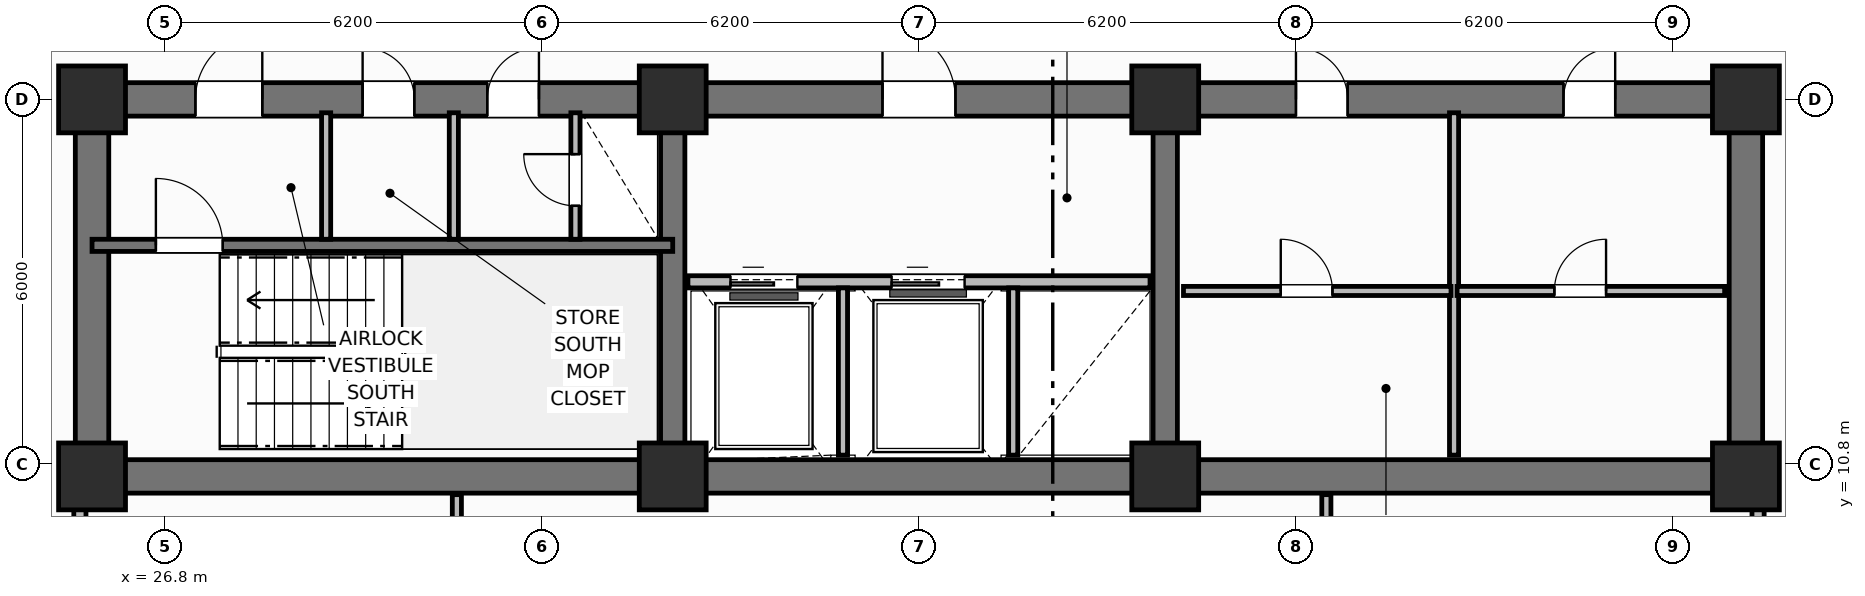
"""IFC4 building model, lengths in metres.
Left out: names, types, materials, properties, quantities, classifications, styles, units other than length and angle.
Written with IfcOpenShell. Run it as: python <this file> out.ifc"""

import sys

from ifc_helpers import new_model, si_unit, direction, frame, frame_2d, origin, origin_2d, place, context, subcontext, project, spatial, rectangle, extrude, element, fill, save


model = new_model("IFC4")
c1 = context("Model", 3, precision=1e-05, world=origin(), true_north=direction((0.0, 1.0)))
c2 = subcontext(c1, "Body", "Model", "MODEL_VIEW")
j1 = project(units=[si_unit("LENGTHUNIT", "METRE"), si_unit("PLANEANGLEUNIT", "RADIAN")], contexts=[c1])
p1 = place(None, origin())
s1 = spatial("IfcSite", under=j1, at=p1, CompositionType="ELEMENT")
p2 = place(p1, origin())
s2 = spatial("IfcBuilding", under=s1, at=p2, CompositionType="ELEMENT")
p3 = place(p2, frame((0.0, 0.0, 95.7)))
s3 = spatial("IfcBuildingStorey", under=s2, at=p3, CompositionType="ELEMENT", Elevation=95.7)
p4 = place(p3, frame((52.8, 10.6, 0.0), z_axis=(0.0, 0.0, 1.0), x_axis=(-1.0, 0.0, 0.0)))
e1 = element("IfcWall", 1, at=p4, inside=s3, PredefinedType="SHEAR", context=c2, shape_type="SweptSolid", body=[
    extrude(rectangle(XDim=27.2, YDim=0.55, at=frame_2d((13.6, 0.0))), origin(), (0.0, 0.0, 1.0), 3.7),
])
for number, where, z_axis, x_axis in (
    (2, (25.6, 10.875, 0.0), (0.0, 0.0, 1.0), (0.0, 1.0, 0.0)),
    (3, (52.8, 10.875, 0.0), (0.0, 0.0, 1.0), (0.0, 1.0, 0.0)),
):
    element("IfcWall", number, at=place(p3, frame(where, z_axis=z_axis, x_axis=x_axis)), inside=s3, PredefinedType="SHEAR", context=c2, shape_type="SweptSolid", body=[
        extrude(rectangle(XDim=5.65, YDim=0.55, at=frame_2d((2.825, 0.0))), origin(), (0.0, 0.0, 1.0), 3.7),
    ])
p5 = place(p3, frame((25.6, 16.8, 0.0), z_axis=(0.0, 0.0, 1.0), x_axis=(1.0, 0.0, 0.0)))
e4 = element("IfcWall", 4, at=p5, inside=s3, PredefinedType="SHEAR", context=c2, shape_type="SweptSolid", body=[
    extrude(rectangle(XDim=27.2, YDim=0.55, at=frame_2d((13.6, 0.0))), origin(), (0.0, 0.0, 1.0), 3.7),
])
p6 = place(p5, frame((1.7, 0.0, 0.0)))
e5 = element("IfcOpeningElement", 5, at=p6, cuts=e4, PredefinedType="OPENING", context=c2, shape_type="SweptSolid", body=[
    extrude(rectangle(XDim=1.1, YDim=2.15, at=frame_2d((0.55, 1.075))), frame((0.0, 0.285, 0.0), z_axis=(0.0, -1.0, 0.0), x_axis=(1.0, 0.0, 0.0)), (0.0, 0.0, 1.0), 0.57),
])
p7 = place(p5, frame((4.45, 0.0, 0.0)))
e6 = element("IfcOpeningElement", 6, at=p7, cuts=e4, PredefinedType="OPENING", context=c2, shape_type="SweptSolid", body=[
    extrude(rectangle(XDim=0.85, YDim=2.1, at=frame_2d((0.425, 1.05))), frame((0.0, 0.285, 0.0), z_axis=(0.0, -1.0, 0.0), x_axis=(1.0, 0.0, 0.0)), (0.0, 0.0, 1.0), 0.57),
])
p8 = place(p5, frame((6.5, 0.0, 0.0)))
e7 = element("IfcOpeningElement", 7, at=p8, cuts=e4, PredefinedType="OPENING", context=c2, shape_type="SweptSolid", body=[
    extrude(rectangle(XDim=0.85, YDim=2.1, at=frame_2d((0.425, 1.05))), frame((0.0, 0.285, 0.0), z_axis=(0.0, -1.0, 0.0), x_axis=(1.0, 0.0, 0.0)), (0.0, 0.0, 1.0), 0.57),
])
p9 = place(p5, frame((13.0, 0.0, 0.0)))
e8 = element("IfcOpeningElement", 8, at=p9, cuts=e4, PredefinedType="OPENING", context=c2, shape_type="SweptSolid", body=[
    extrude(rectangle(XDim=1.2, YDim=2.15, at=frame_2d((0.6, 1.075))), frame((0.0, 0.285, 0.0), z_axis=(0.0, -1.0, 0.0), x_axis=(1.0, 0.0, 0.0)), (0.0, 0.0, 1.0), 0.57),
])
p10 = place(p5, frame((19.8, 0.0, 0.0)))
e9 = element("IfcOpeningElement", 9, at=p10, cuts=e4, PredefinedType="OPENING", context=c2, shape_type="SweptSolid", body=[
    extrude(rectangle(XDim=0.85, YDim=2.1, at=frame_2d((0.425, 1.05))), frame((0.0, 0.285, 0.0), z_axis=(0.0, -1.0, 0.0), x_axis=(1.0, 0.0, 0.0)), (0.0, 0.0, 1.0), 0.57),
])
p11 = place(p5, frame((24.2, 0.0, 0.0)))
e10 = element("IfcOpeningElement", 10, at=p11, cuts=e4, PredefinedType="OPENING", context=c2, shape_type="SweptSolid", body=[
    extrude(rectangle(XDim=0.85, YDim=2.1, at=frame_2d((0.425, 1.05))), frame((0.0, 0.285, 0.0), z_axis=(0.0, -1.0, 0.0), x_axis=(1.0, 0.0, 0.0)), (0.0, 0.0, 1.0), 0.57),
])
for number, where, z_axis, x_axis in (
    (11, (35.15, 10.875, 0.0), (0.0, 0.0, 1.0), (0.0, 1.0, 0.0)),
    (12, (43.25, 10.875, 0.0), (0.0, 0.0, 1.0), (0.0, 1.0, 0.0)),
):
    element("IfcWall", number, at=place(p3, frame(where, z_axis=z_axis, x_axis=x_axis)), inside=s3, PredefinedType="SHEAR", context=c2, shape_type="SweptSolid", body=[
        extrude(rectangle(XDim=5.65, YDim=0.4, at=frame_2d((2.825, 0.0))), origin(), (0.0, 0.0, 1.0), 3.7),
    ])
for number, where, z_axis, x_axis in (
    (13, (25.6, 10.6, 0.0), (0.0, 0.0, 1.0), (1.0, 0.0, 0.0)),
    (14, (25.6, 16.8, 0.0), (0.0, 0.0, 1.0), (1.0, 0.0, 0.0)),
    (15, (35.15, 10.6, 0.0), (0.0, 0.0, 1.0), (1.0, 0.0, 0.0)),
    (16, (35.15, 16.8, 0.0), (0.0, 0.0, 1.0), (1.0, 0.0, 0.0)),
    (17, (43.25, 10.6, 0.0), (0.0, 0.0, 1.0), (1.0, 0.0, 0.0)),
    (18, (43.25, 16.8, 0.0), (0.0, 0.0, 1.0), (1.0, 0.0, 0.0)),
    (19, (52.8, 10.6, 0.0), (0.0, 0.0, 1.0), (1.0, 0.0, 0.0)),
    (20, (52.8, 16.8, 0.0), (0.0, 0.0, 1.0), (1.0, 0.0, 0.0)),
):
    element("IfcColumn", number, at=place(p3, frame(where, z_axis=z_axis, x_axis=x_axis)), inside=s3, PredefinedType="COLUMN", context=c2, shape_type="SweptSolid", body=[
        extrude(rectangle(XDim=1.1, YDim=1.1, at=origin_2d()), origin(), (0.0, 0.0, 1.0), 3.7),
    ])
p12 = place(p3, frame((25.6, 14.4, 0.0), z_axis=(0.0, 0.0, 1.0), x_axis=(1.0, 0.0, 0.0)))
e21 = element("IfcWall", 21, at=p12, inside=s3, PredefinedType="SHEAR", context=c2, shape_type="SweptSolid", body=[
    extrude(rectangle(XDim=9.55, YDim=0.2, at=frame_2d((4.775, 0.0))), origin(), (0.0, 0.0, 1.0), 3.7),
])
p13 = place(p12, frame((1.05, 0.0, 0.0)))
e22 = element("IfcOpeningElement", 22, at=p13, cuts=e21, PredefinedType="OPENING", context=c2, shape_type="SweptSolid", body=[
    extrude(rectangle(XDim=1.1, YDim=2.15, at=frame_2d((0.55, 1.075))), frame((0.0, 0.11, 0.0), z_axis=(0.0, -1.0, 0.0), x_axis=(1.0, 0.0, 0.0)), (0.0, 0.0, 1.0), 0.22),
])
for number, where, z_axis, x_axis in (
    (23, (29.45, 14.5, 0.0), (0.0, 0.0, 1.0), (0.0, 1.0, 0.0)),
    (24, (31.55, 14.5, 0.0), (0.0, 0.0, 1.0), (0.0, 1.0, 0.0)),
):
    element("IfcWall", number, at=place(p3, frame(where, z_axis=z_axis, x_axis=x_axis)), inside=s3, PredefinedType="PARTITIONING", context=c2, shape_type="SweptSolid", body=[
        extrude(rectangle(XDim=2.08, YDim=0.15, at=frame_2d((1.04, 0.0))), origin(), (0.0, 0.0, 1.0), 2.53),
    ])
p14 = place(p3, frame((33.55, 14.5, 0.0), z_axis=(0.0, 0.0, 1.0), x_axis=(0.0, 1.0, 0.0)))
e25 = element("IfcWall", 25, at=p14, inside=s3, PredefinedType="PARTITIONING", context=c2, shape_type="SweptSolid", body=[
    extrude(rectangle(XDim=2.08, YDim=0.15, at=frame_2d((1.04, 0.0))), origin(), (0.0, 0.0, 1.0), 2.53),
])
p15 = place(p14, frame((0.55, 0.0, 0.0)))
e26 = element("IfcOpeningElement", 26, at=p15, cuts=e25, PredefinedType="OPENING", context=c2, shape_type="SweptSolid", body=[
    extrude(rectangle(XDim=0.85, YDim=2.05, at=frame_2d((0.425, 1.025))), frame((0.0, 0.085, 0.0), z_axis=(0.0, -1.0, 0.0), x_axis=(1.0, 0.0, 0.0)), (0.0, 0.0, 1.0), 0.17),
])
p16 = place(p3, frame((35.4, 13.8, 0.0), z_axis=(0.0, 0.0, 1.0), x_axis=(1.0, 0.0, 0.0)))
e27 = element("IfcWall", 27, at=p16, inside=s3, PredefinedType="PARTITIONING", context=c2, shape_type="SweptSolid", body=[
    extrude(rectangle(XDim=7.6, YDim=0.2, at=frame_2d((3.8, 0.0))), origin(), (0.0, 0.0, 1.0), 2.3),
])
p17 = place(p16, frame((0.7, 0.0, 0.0)))
e28 = element("IfcOpeningElement", 28, at=p17, cuts=e27, PredefinedType="OPENING", context=c2, shape_type="SweptSolid", body=[
    extrude(rectangle(XDim=1.1, YDim=2.15, at=frame_2d((0.55, 1.075))), frame((0.0, 0.11, 0.0), z_axis=(0.0, -1.0, 0.0), x_axis=(1.0, 0.0, 0.0)), (0.0, 0.0, 1.0), 0.22),
])
p18 = place(p16, frame((3.35, 0.0, 0.0)))
e29 = element("IfcOpeningElement", 29, at=p18, cuts=e27, PredefinedType="OPENING", context=c2, shape_type="SweptSolid", body=[
    extrude(rectangle(XDim=1.2, YDim=2.15, at=frame_2d((0.6, 1.075))), frame((0.0, 0.11, 0.0), z_axis=(0.0, -1.0, 0.0), x_axis=(1.0, 0.0, 0.0)), (0.0, 0.0, 1.0), 0.22),
])
for number, where, z_axis, x_axis in (
    (30, (37.95, 10.95, 0.0), (0.0, 0.0, 1.0), (0.0, 1.0, 0.0)),
    (31, (40.75, 10.95, 0.0), (0.0, 0.0, 1.0), (0.0, 1.0, 0.0)),
):
    element("IfcWall", number, at=place(p3, frame(where, z_axis=z_axis, x_axis=x_axis)), inside=s3, PredefinedType="PARTITIONING", context=c2, shape_type="SweptSolid", body=[
        extrude(rectangle(XDim=2.75, YDim=0.15, at=frame_2d((1.375, 0.0))), origin(), (0.0, 0.0, 1.0), 2.53),
    ])
p19 = place(p3, frame((48.0, 10.95, 0.0), z_axis=(0.0, 0.0, 1.0), x_axis=(0.0, 1.0, 0.0)))
e32 = element("IfcWall", 32, at=p19, inside=s3, PredefinedType="PARTITIONING", context=c2, shape_type="SweptSolid", body=[
    extrude(rectangle(XDim=5.63, YDim=0.15, at=frame_2d((2.815, 0.0))), origin(), (0.0, 0.0, 1.0), 2.53),
])
p20 = place(p3, frame((43.55, 13.65, 0.0), z_axis=(0.0, 0.0, 1.0), x_axis=(1.0, 0.0, 0.0)))
e33 = element("IfcWall", 33, at=p20, inside=s3, PredefinedType="PARTITIONING", context=c2, shape_type="SweptSolid", body=[
    extrude(rectangle(XDim=4.4, YDim=0.15, at=frame_2d((2.2, 0.0))), origin(), (0.0, 0.0, 1.0), 2.53),
])
p21 = place(p20, frame((1.6, 0.0, 0.0)))
e34 = element("IfcOpeningElement", 34, at=p21, cuts=e33, PredefinedType="OPENING", context=c2, shape_type="SweptSolid", body=[
    extrude(rectangle(XDim=0.85, YDim=2.1, at=frame_2d((0.425, 1.05))), frame((0.0, 0.085, 0.0), z_axis=(0.0, -1.0, 0.0), x_axis=(1.0, 0.0, 0.0)), (0.0, 0.0, 1.0), 0.17),
])
p22 = place(p3, frame((48.05, 13.65, 0.0), z_axis=(0.0, 0.0, 1.0), x_axis=(1.0, 0.0, 0.0)))
e35 = element("IfcWall", 35, at=p22, inside=s3, PredefinedType="PARTITIONING", context=c2, shape_type="SweptSolid", body=[
    extrude(rectangle(XDim=4.4, YDim=0.15, at=frame_2d((2.2, 0.0))), origin(), (0.0, 0.0, 1.0), 2.53),
])
p23 = place(p22, frame((1.6, 0.0, 0.0)))
e36 = element("IfcOpeningElement", 36, at=p23, cuts=e35, PredefinedType="OPENING", context=c2, shape_type="SweptSolid", body=[
    extrude(rectangle(XDim=0.85, YDim=2.1, at=frame_2d((0.425, 1.05))), frame((0.0, 0.085, 0.0), z_axis=(0.0, -1.0, 0.0), x_axis=(1.0, 0.0, 0.0)), (0.0, 0.0, 1.0), 0.17),
])
p24 = place(p3, frame((31.6, 4.97, 0.0), z_axis=(0.0, 0.0, 1.0), x_axis=(0.0, 1.0, 0.0)))
e37 = element("IfcWall", 37, at=p24, inside=s3, PredefinedType="PARTITIONING", context=c2, shape_type="SweptSolid", body=[
    extrude(rectangle(XDim=5.33, YDim=0.15, at=frame_2d((2.665, 0.0))), origin(), (0.0, 0.0, 1.0), 2.53),
])
p25 = place(p24, frame((1.65, 0.0, 0.0)))
e38 = element("IfcOpeningElement", 38, at=p25, cuts=e37, PredefinedType="OPENING", context=c2, shape_type="SweptSolid", body=[
    extrude(rectangle(XDim=0.9, YDim=2.1, at=frame_2d((0.45, 1.05))), frame((0.0, 0.085, 0.0), z_axis=(0.0, -1.0, 0.0), x_axis=(1.0, 0.0, 0.0)), (0.0, 0.0, 1.0), 0.17),
])
p26 = place(p3, frame((45.9, 4.97, 0.0), z_axis=(0.0, 0.0, 1.0), x_axis=(0.0, 1.0, 0.0)))
e39 = element("IfcWall", 39, at=p26, inside=s3, PredefinedType="PARTITIONING", context=c2, shape_type="SweptSolid", body=[
    extrude(rectangle(XDim=5.33, YDim=0.15, at=frame_2d((2.665, 0.0))), origin(), (0.0, 0.0, 1.0), 2.53),
])
p27 = place(p3, frame((25.4, 5.97, 0.0), z_axis=(0.0, 0.0, 1.0), x_axis=(0.0, 1.0, 0.0)))
e40 = element("IfcWall", 40, at=p27, inside=s3, PredefinedType="PARTITIONING", context=c2, shape_type="SweptSolid", body=[
    extrude(rectangle(XDim=4.33, YDim=0.2, at=frame_2d((2.165, 0.0))), origin(), (0.0, 0.0, 1.0), 2.53),
])
p28 = place(p27, frame((0.85, 0.0, 0.0)))
e41 = element("IfcOpeningElement", 41, at=p28, cuts=e40, PredefinedType="OPENING", context=c2, shape_type="SweptSolid", body=[
    extrude(rectangle(XDim=0.9, YDim=2.1, at=frame_2d((0.45, 1.05))), frame((0.0, 0.11, 0.0), z_axis=(0.0, -1.0, 0.0), x_axis=(1.0, 0.0, 0.0)), (0.0, 0.0, 1.0), 0.22),
])
p29 = place(p3, frame((53.0, 5.97, 0.0), z_axis=(0.0, 0.0, 1.0), x_axis=(0.0, 1.0, 0.0)))
e42 = element("IfcWall", 42, at=p29, inside=s3, PredefinedType="PARTITIONING", context=c2, shape_type="SweptSolid", body=[
    extrude(rectangle(XDim=4.33, YDim=0.2, at=frame_2d((2.165, 0.0))), origin(), (0.0, 0.0, 1.0), 2.53),
])
p30 = place(p29, frame((0.85, 0.0, 0.0)))
e43 = element("IfcOpeningElement", 43, at=p30, cuts=e42, PredefinedType="OPENING", context=c2, shape_type="SweptSolid", body=[
    extrude(rectangle(XDim=0.9, YDim=2.1, at=frame_2d((0.45, 1.05))), frame((0.0, 0.11, 0.0), z_axis=(0.0, -1.0, 0.0), x_axis=(1.0, 0.0, 0.0)), (0.0, 0.0, 1.0), 0.22),
])
p31 = place(p13, origin())
e44 = element("IfcDoor", 44, at=p31, inside=s3, OperationType="SINGLE_SWING_LEFT", PredefinedType="DOOR", context=c2, shape_type="SweptSolid", body=[
    extrude(rectangle(XDim=1.1, YDim=2.15, at=frame_2d((0.55, 1.075))), frame((0.0, 0.025, 0.0), z_axis=(0.0, -1.0, 0.0), x_axis=(1.0, 0.0, 0.0)), (0.0, 0.0, 1.0), 0.05),
])
fill(e22, e44)
p32 = place(p15, origin())
e45 = element("IfcDoor", 45, at=p32, inside=s3, OperationType="SINGLE_SWING_RIGHT", PredefinedType="TRAPDOOR", context=c2, shape_type="SweptSolid", body=[
    extrude(rectangle(XDim=0.85, YDim=2.05, at=frame_2d((0.425, 1.025))), frame((0.0, 0.025, 0.0), z_axis=(0.0, -1.0, 0.0), x_axis=(1.0, 0.0, 0.0)), (0.0, 0.0, 1.0), 0.05),
])
fill(e26, e45)
p33 = place(p17, origin())
e46 = element("IfcDoor", 46, at=p33, inside=s3, OperationType="SLIDING_TO_LEFT", PredefinedType="DOOR", context=c2, shape_type="SweptSolid", body=[
    extrude(rectangle(XDim=1.1, YDim=2.15, at=frame_2d((0.55, 1.075))), frame((0.0, 0.025, 0.0), z_axis=(0.0, -1.0, 0.0), x_axis=(1.0, 0.0, 0.0)), (0.0, 0.0, 1.0), 0.05),
])
fill(e28, e46)
p34 = place(p18, origin())
e47 = element("IfcDoor", 47, at=p34, inside=s3, OperationType="SLIDING_TO_LEFT", PredefinedType="DOOR", context=c2, shape_type="SweptSolid", body=[
    extrude(rectangle(XDim=1.2, YDim=2.15, at=frame_2d((0.6, 1.075))), frame((0.0, 0.025, 0.0), z_axis=(0.0, -1.0, 0.0), x_axis=(1.0, 0.0, 0.0)), (0.0, 0.0, 1.0), 0.05),
])
fill(e29, e47)
p35 = place(p21, origin())
e48 = element("IfcDoor", 48, at=p35, inside=s3, OperationType="SINGLE_SWING_LEFT", PredefinedType="DOOR", context=c2, shape_type="SweptSolid", body=[
    extrude(rectangle(XDim=0.85, YDim=2.1, at=frame_2d((0.425, 1.05))), frame((0.0, 0.025, 0.0), z_axis=(0.0, -1.0, 0.0), x_axis=(1.0, 0.0, 0.0)), (0.0, 0.0, 1.0), 0.05),
])
fill(e34, e48)
p36 = place(p23, origin())
e49 = element("IfcDoor", 49, at=p36, inside=s3, OperationType="SINGLE_SWING_RIGHT", PredefinedType="DOOR", context=c2, shape_type="SweptSolid", body=[
    extrude(rectangle(XDim=0.85, YDim=2.1, at=frame_2d((0.425, 1.05))), frame((0.0, 0.025, 0.0), z_axis=(0.0, -1.0, 0.0), x_axis=(1.0, 0.0, 0.0)), (0.0, 0.0, 1.0), 0.05),
])
fill(e36, e49)
p37 = place(p6, origin())
e50 = element("IfcDoor", 50, at=p37, inside=s3, OperationType="SINGLE_SWING_RIGHT", PredefinedType="DOOR", context=c2, shape_type="SweptSolid", body=[
    extrude(rectangle(XDim=1.1, YDim=2.15, at=frame_2d((0.55, 1.075))), frame((0.0, 0.025, 0.0), z_axis=(0.0, -1.0, 0.0), x_axis=(1.0, 0.0, 0.0)), (0.0, 0.0, 1.0), 0.05),
])
fill(e5, e50)
p38 = place(p7, origin())
e51 = element("IfcDoor", 51, at=p38, inside=s3, OperationType="SINGLE_SWING_LEFT", PredefinedType="DOOR", context=c2, shape_type="SweptSolid", body=[
    extrude(rectangle(XDim=0.85, YDim=2.1, at=frame_2d((0.425, 1.05))), frame((0.0, 0.025, 0.0), z_axis=(0.0, -1.0, 0.0), x_axis=(1.0, 0.0, 0.0)), (0.0, 0.0, 1.0), 0.05),
])
fill(e6, e51)
p39 = place(p8, origin())
e52 = element("IfcDoor", 52, at=p39, inside=s3, OperationType="SINGLE_SWING_RIGHT", PredefinedType="DOOR", context=c2, shape_type="SweptSolid", body=[
    extrude(rectangle(XDim=0.85, YDim=2.1, at=frame_2d((0.425, 1.05))), frame((0.0, 0.025, 0.0), z_axis=(0.0, -1.0, 0.0), x_axis=(1.0, 0.0, 0.0)), (0.0, 0.0, 1.0), 0.05),
])
fill(e7, e52)
p40 = place(p9, origin())
e53 = element("IfcDoor", 53, at=p40, inside=s3, OperationType="SINGLE_SWING_LEFT", PredefinedType="DOOR", context=c2, shape_type="SweptSolid", body=[
    extrude(rectangle(XDim=1.2, YDim=2.15, at=frame_2d((0.6, 1.075))), frame((0.0, 0.025, 0.0), z_axis=(0.0, -1.0, 0.0), x_axis=(1.0, 0.0, 0.0)), (0.0, 0.0, 1.0), 0.05),
])
fill(e8, e53)
p41 = place(p10, origin())
e54 = element("IfcDoor", 54, at=p41, inside=s3, OperationType="SINGLE_SWING_LEFT", PredefinedType="DOOR", context=c2, shape_type="SweptSolid", body=[
    extrude(rectangle(XDim=0.85, YDim=2.1, at=frame_2d((0.425, 1.05))), frame((0.0, 0.025, 0.0), z_axis=(0.0, -1.0, 0.0), x_axis=(1.0, 0.0, 0.0)), (0.0, 0.0, 1.0), 0.05),
])
fill(e9, e54)
p42 = place(p11, origin())
e55 = element("IfcDoor", 55, at=p42, inside=s3, OperationType="SINGLE_SWING_RIGHT", PredefinedType="DOOR", context=c2, shape_type="SweptSolid", body=[
    extrude(rectangle(XDim=0.85, YDim=2.1, at=frame_2d((0.425, 1.05))), frame((0.0, 0.025, 0.0), z_axis=(0.0, -1.0, 0.0), x_axis=(1.0, 0.0, 0.0)), (0.0, 0.0, 1.0), 0.05),
])
fill(e10, e55)
save(model, sys.argv[1])
